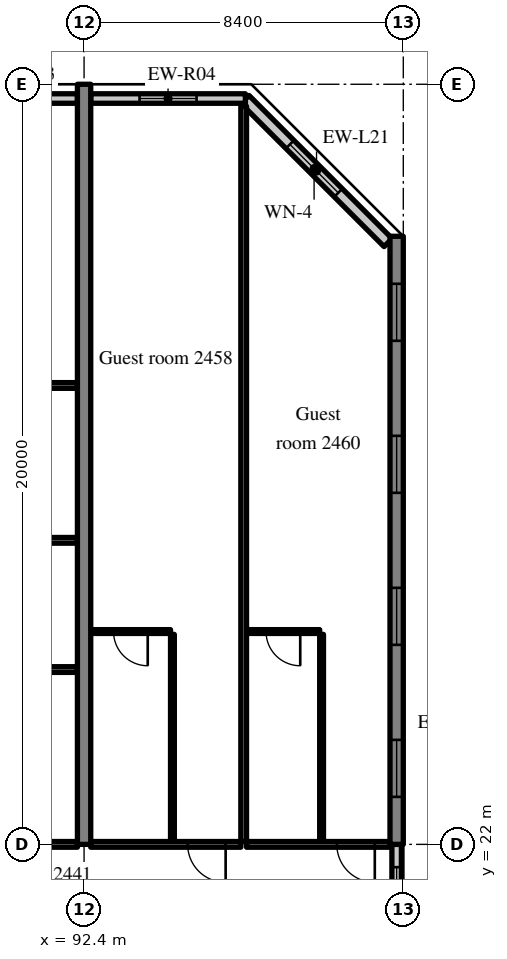
"""IFC4 building model, lengths in metres.
Left out: names, types, materials, properties, quantities, classifications, styles, units other than length and angle.
Written with IfcOpenShell. Run it as: python <this file> out.ifc"""

import sys

from ifc_helpers import new_model, si_unit, direction, frame, frame_2d, origin, place, context, subcontext, project, spatial, rectangle, extrude, source, transform, mapped, element, fill, save


model = new_model("IFC4")
c1 = context("Model", 3, precision=1e-05, world=origin(), true_north=direction((0.0, 1.0)))
c2 = subcontext(c1, "Body", "Model", "MODEL_VIEW")
j1 = project(units=[si_unit("LENGTHUNIT", "METRE"), si_unit("PLANEANGLEUNIT", "RADIAN")], contexts=[c1])
p1 = place(None, origin())
s1 = spatial("IfcSite", under=j1, at=p1, CompositionType="ELEMENT")
p2 = place(p1, origin())
s2 = spatial("IfcBuilding", under=s1, at=p2, CompositionType="ELEMENT")
p3 = place(p2, frame((0.0, 0.0, 102.8)))
s3 = spatial("IfcBuildingStorey", under=s2, at=p3, CompositionType="ELEMENT", Elevation=102.8)
m1 = source(origin(), c2, "Body", "SweptSolid", [
    extrude(rectangle(XDim=20.0, YDim=0.35, at=frame_2d((10.0, 0.0))), origin(), (0.0, 0.0, 1.0), 3.52),
])
p4 = place(p3, frame((92.4, 22.0, 0.0), z_axis=(0.0, 0.0, 1.0), x_axis=(0.0, 1.0, 0.0)))
e1 = element("IfcWall", 1, at=p4, inside=s3, PredefinedType="SHEAR", context=c2, shape_type="MappedRepresentation", body=[
    mapped(m1, transform((0.0, 0.0, 0.0), scale=1.0)),
])
m2 = source(origin(), c2, "Body", "SweptSolid", [
    extrude(rectangle(XDim=16.0, YDim=0.35, at=frame_2d((8.0, 0.0))), origin(), (0.0, 0.0, 1.0), 3.52),
])
p5 = place(p3, frame((100.625, 22.0, 0.0), z_axis=(0.0, 0.0, 1.0), x_axis=(0.0, 1.0, 0.0)))
e2 = element("IfcWall", 2, at=p5, inside=s3, PredefinedType="SHEAR", context=c2, shape_type="MappedRepresentation", body=[
    mapped(m2, transform((0.0, 0.0, 0.0), scale=1.0)),
])
m3 = source(origin(), c2, "Body", "SweptSolid", [
    extrude(rectangle(XDim=1.5, YDim=1.5, at=frame_2d((0.75, 0.75))), frame((0.0, 0.185, 0.0), z_axis=(0.0, -1.0, 0.0), x_axis=(1.0, 0.0, 0.0)), (0.0, 0.0, 1.0), 0.37),
])
p6 = place(p5, frame((1.25, 0.0, 0.9)))
e3 = element("IfcOpeningElement", 3, at=p6, cuts=e2, PredefinedType="OPENING", context=c2, shape_type="MappedRepresentation", body=[
    mapped(m3, transform((0.0, 0.0, 0.0), scale=1.0)),
])
p7 = place(p5, frame((5.25, 0.0, 0.9)))
e4 = element("IfcOpeningElement", 4, at=p7, cuts=e2, PredefinedType="OPENING", context=c2, shape_type="MappedRepresentation", body=[
    mapped(m3, transform((0.0, 0.0, 0.0), scale=1.0)),
])
p8 = place(p5, frame((9.25, 0.0, 0.9)))
e5 = element("IfcOpeningElement", 5, at=p8, cuts=e2, PredefinedType="OPENING", context=c2, shape_type="MappedRepresentation", body=[
    mapped(m3, transform((0.0, 0.0, 0.0), scale=1.0)),
])
p9 = place(p5, frame((13.25, 0.0, 0.9)))
e6 = element("IfcOpeningElement", 6, at=p9, cuts=e2, PredefinedType="OPENING", context=c2, shape_type="MappedRepresentation", body=[
    mapped(m3, transform((0.0, 0.0, 0.0), scale=1.0)),
])
m4 = source(origin(), c2, "Body", "SweptSolid", [
    extrude(rectangle(XDim=5.326, YDim=0.3, at=frame_2d((2.663, 0.0))), origin(), (0.0, 0.0, 1.0), 3.52),
])
p10 = place(p3, frame((100.4, 37.834, 0.0), z_axis=(0.0, 0.0, 1.0), x_axis=(-0.707083859269, 0.707129702361, 0.0)))
e7 = element("IfcWall", 7, at=p10, inside=s3, PredefinedType="SOLIDWALL", context=c2, shape_type="MappedRepresentation", body=[
    mapped(m4, transform((0.0, 0.0, 0.0), scale=1.0)),
])
m5 = source(origin(), c2, "Body", "SweptSolid", [
    extrude(rectangle(XDim=1.8, YDim=1.5, at=frame_2d((0.9, 0.75))), frame((0.0, 0.16, 0.0), z_axis=(0.0, -1.0, 0.0), x_axis=(1.0, 0.0, 0.0)), (0.0, 0.0, 1.0), 0.32),
])
p11 = place(p10, frame((1.854, 0.0, 0.9)))
e8 = element("IfcOpeningElement", 8, at=p11, cuts=e7, PredefinedType="OPENING", context=c2, shape_type="MappedRepresentation", body=[
    mapped(m5, transform((0.0, 0.0, 0.0), scale=1.0)),
])
m6 = source(origin(), c2, "Body", "SweptSolid", [
    extrude(rectangle(XDim=3.675, YDim=0.25, at=frame_2d((1.837, 0.0))), origin(), (0.0, 0.0, 1.0), 2.82),
])
p12 = place(p3, frame((92.225, 41.625, 0.0), z_axis=(0.0, 0.0, 1.0), x_axis=(-1.0, 0.0, 0.0)))
e9 = element("IfcWall", 9, at=p12, inside=s3, PredefinedType="SOLIDWALL", context=c2, shape_type="MappedRepresentation", body=[
    mapped(m6, transform((0.0, 0.0, 0.0), scale=1.0)),
])
m7 = source(origin(), c2, "Body", "SweptSolid", [
    extrude(rectangle(XDim=1.5, YDim=1.5, at=frame_2d((0.75, 0.75))), frame((0.0, 0.135, 0.0), z_axis=(0.0, -1.0, 0.0), x_axis=(1.0, 0.0, 0.0)), (0.0, 0.0, 1.0), 0.27),
])
p13 = place(p12, frame((1.087, 0.0, 0.9)))
e10 = element("IfcOpeningElement", 10, at=p13, cuts=e9, PredefinedType="OPENING", context=c2, shape_type="MappedRepresentation", body=[
    mapped(m7, transform((0.0, 0.0, 0.0), scale=1.0)),
])
m8 = source(origin(), c2, "Body", "SweptSolid", [
    extrude(rectangle(XDim=4.07, YDim=0.25, at=frame_2d((2.035, 0.0))), origin(), (0.0, 0.0, 1.0), 2.82),
])
p14 = place(p3, frame((96.645, 41.625, 0.0), z_axis=(0.0, 0.0, 1.0), x_axis=(-1.0, 0.0, 0.0)))
e11 = element("IfcWall", 11, at=p14, inside=s3, PredefinedType="SOLIDWALL", context=c2, shape_type="MappedRepresentation", body=[
    mapped(m8, transform((0.0, 0.0, 0.0), scale=1.0)),
])
p15 = place(p14, frame((1.285, 0.0, 0.9)))
e12 = element("IfcOpeningElement", 12, at=p15, cuts=e11, PredefinedType="OPENING", context=c2, shape_type="MappedRepresentation", body=[
    mapped(m7, transform((0.0, 0.0, 0.0), scale=1.0)),
])
m9 = source(origin(), c2, "Body", "SweptSolid", [
    extrude(rectangle(XDim=2.4, YDim=0.25, at=frame_2d((1.2, 0.0))), origin(), (0.0, 0.0, 1.0), 2.62),
])
p16 = place(p3, frame((100.625, 19.6, 0.0), z_axis=(0.0, 0.0, 1.0), x_axis=(0.0, 1.0, 0.0)))
e13 = element("IfcWall", 13, at=p16, inside=s3, PredefinedType="SOLIDWALL", context=c2, shape_type="MappedRepresentation", body=[
    mapped(m9, transform((0.0, 0.0, 0.0), scale=1.0)),
])
m10 = source(origin(), c2, "Body", "SweptSolid", [
    extrude(rectangle(XDim=1.2, YDim=1.5, at=frame_2d((0.6, 0.75))), frame((0.0, 0.135, 0.0), z_axis=(0.0, -1.0, 0.0), x_axis=(1.0, 0.0, 0.0)), (0.0, 0.0, 1.0), 0.27),
])
p17 = place(p16, frame((0.6, 0.0, 0.9)))
e14 = element("IfcOpeningElement", 14, at=p17, cuts=e13, PredefinedType="OPENING", context=c2, shape_type="MappedRepresentation", body=[
    mapped(m10, transform((0.0, 0.0, 0.0), scale=1.0)),
])
m11 = source(origin(), c2, "Body", "SweptSolid", [
    extrude(rectangle(XDim=5.5, YDim=0.15, at=frame_2d((2.75, 0.0))), origin(), (0.0, 0.0, 1.0), 2.82),
])
p18 = place(p3, frame((86.725, 22.0, 0.0), z_axis=(0.0, 0.0, 1.0), x_axis=(1.0, 0.0, 0.0)))
e15 = element("IfcWall", 15, at=p18, inside=s3, PredefinedType="PARTITIONING", context=c2, shape_type="MappedRepresentation", body=[
    mapped(m11, transform((0.0, 0.0, 0.0), scale=1.0)),
])
m12 = source(origin(), c2, "Body", "SweptSolid", [
    extrude(rectangle(XDim=5.5, YDim=0.15, at=frame_2d((2.75, 0.0))), origin(), (0.0, 0.0, 1.0), 3.52),
])
for number, where, z_axis, x_axis in (
    (16, (86.725, 26.6, 0.0), (0.0, 0.0, 1.0), (1.0, 0.0, 0.0)),
    (17, (86.725, 30.0, 0.0), (0.0, 0.0, 1.0), (1.0, 0.0, 0.0)),
):
    element("IfcWall", number, at=place(p3, frame(where, z_axis=z_axis, x_axis=x_axis)), inside=s3, PredefinedType="PARTITIONING", context=c2, shape_type="MappedRepresentation", body=[
        mapped(m12, transform((0.0, 0.0, 0.0), scale=1.0)),
    ])
m13 = source(origin(), c2, "Body", "SweptSolid", [
    extrude(rectangle(XDim=8.05, YDim=0.15, at=frame_2d((4.025, 0.0))), origin(), (0.0, 0.0, 1.0), 3.52),
])
p19 = place(p3, frame((84.175, 34.075, 0.0), z_axis=(0.0, 0.0, 1.0), x_axis=(1.0, 0.0, 0.0)))
e18 = element("IfcWall", 18, at=p19, inside=s3, PredefinedType="PARTITIONING", context=c2, shape_type="MappedRepresentation", body=[
    mapped(m13, transform((0.0, 0.0, 0.0), scale=1.0)),
])
m14 = source(origin(), c2, "Body", "SweptSolid", [
    extrude(rectangle(XDim=1.0, YDim=2.1, at=frame_2d((0.5, 1.05))), frame((0.0, 0.085, 0.0), z_axis=(0.0, -1.0, 0.0), x_axis=(1.0, 0.0, 0.0)), (0.0, 0.0, 1.0), 0.17),
])
p20 = place(p19, frame((0.7, 0.0, 0.0)))
e19 = element("IfcOpeningElement", 19, at=p20, cuts=e18, PredefinedType="OPENING", context=c2, shape_type="MappedRepresentation", body=[
    mapped(m14, transform((0.0, 0.0, 0.0), scale=1.0)),
])
m15 = source(origin(), c2, "Body", "SweptSolid", [
    extrude(rectangle(XDim=5.45, YDim=0.1, at=frame_2d((2.725, 0.0))), origin(), (0.0, 0.0, 1.0), 3.52),
])
p21 = place(p3, frame((94.725, 22.075, 0.0), z_axis=(0.0, 0.0, 1.0), x_axis=(0.0, 1.0, 0.0)))
e20 = element("IfcWall", 20, at=p21, inside=s3, PredefinedType="PARTITIONING", context=c2, shape_type="MappedRepresentation", body=[
    mapped(m15, transform((0.0, 0.0, 0.0), scale=1.0)),
])
m16 = source(origin(), c2, "Body", "SweptSolid", [
    extrude(rectangle(XDim=2.1, YDim=0.1, at=frame_2d((1.05, 0.0))), origin(), (0.0, 0.0, 1.0), 3.52),
])
p22 = place(p3, frame((92.575, 27.6, 0.0), z_axis=(0.0, 0.0, 1.0), x_axis=(1.0, 0.0, 0.0)))
e21 = element("IfcWall", 21, at=p22, inside=s3, PredefinedType="PARTITIONING", context=c2, shape_type="MappedRepresentation", body=[
    mapped(m16, transform((0.0, 0.0, 0.0), scale=1.0)),
])
m17 = source(origin(), c2, "Body", "SweptSolid", [
    extrude(rectangle(XDim=0.9, YDim=2.1, at=frame_2d((0.45, 1.05))), frame((0.0, 0.06, 0.0), z_axis=(0.0, -1.0, 0.0), x_axis=(1.0, 0.0, 0.0)), (0.0, 0.0, 1.0), 0.12),
])
p23 = place(p22, frame((0.6, 0.0, 0.0)))
e22 = element("IfcOpeningElement", 22, at=p23, cuts=e21, PredefinedType="OPENING", context=c2, shape_type="MappedRepresentation", body=[
    mapped(m17, transform((0.0, 0.0, 0.0), scale=1.0)),
])
m18 = source(origin(), c2, "Body", "SweptSolid", [
    extrude(rectangle(XDim=3.95, YDim=0.15, at=frame_2d((1.975, 0.0))), origin(), (0.0, 0.0, 1.0), 2.82),
])
p24 = place(p3, frame((92.575, 22.0, 0.0), z_axis=(0.0, 0.0, 1.0), x_axis=(1.0, 0.0, 0.0)))
e23 = element("IfcWall", 23, at=p24, inside=s3, PredefinedType="PARTITIONING", context=c2, shape_type="MappedRepresentation", body=[
    mapped(m18, transform((0.0, 0.0, 0.0), scale=1.0)),
])
p25 = place(p24, frame((2.55, 0.0, 0.0)))
e24 = element("IfcOpeningElement", 24, at=p25, cuts=e23, PredefinedType="OPENING", context=c2, shape_type="MappedRepresentation", body=[
    mapped(m14, transform((0.0, 0.0, 0.0), scale=1.0)),
])
p26 = place(p3, frame((98.65, 22.075, 0.0), z_axis=(0.0, 0.0, 1.0), x_axis=(0.0, 1.0, 0.0)))
e25 = element("IfcWall", 25, at=p26, inside=s3, PredefinedType="PARTITIONING", context=c2, shape_type="MappedRepresentation", body=[
    mapped(m15, transform((0.0, 0.0, 0.0), scale=1.0)),
])
m19 = source(origin(), c2, "Body", "SweptSolid", [
    extrude(rectangle(XDim=1.925, YDim=0.1, at=frame_2d((0.962, 0.0))), origin(), (0.0, 0.0, 1.0), 3.52),
])
p27 = place(p3, frame((96.675, 27.6, 0.0), z_axis=(0.0, 0.0, 1.0), x_axis=(1.0, 0.0, 0.0)))
e26 = element("IfcWall", 26, at=p27, inside=s3, PredefinedType="PARTITIONING", context=c2, shape_type="MappedRepresentation", body=[
    mapped(m19, transform((0.0, 0.0, 0.0), scale=1.0)),
])
p28 = place(p27, frame((0.513, 0.0, 0.0)))
e27 = element("IfcOpeningElement", 27, at=p28, cuts=e26, PredefinedType="OPENING", context=c2, shape_type="MappedRepresentation", body=[
    mapped(m17, transform((0.0, 0.0, 0.0), scale=1.0)),
])
m20 = source(origin(), c2, "Body", "SweptSolid", [
    extrude(rectangle(XDim=3.775, YDim=0.15, at=frame_2d((1.887, 0.0))), origin(), (0.0, 0.0, 1.0), 2.82),
])
p29 = place(p3, frame((96.675, 22.0, 0.0), z_axis=(0.0, 0.0, 1.0), x_axis=(1.0, 0.0, 0.0)))
e28 = element("IfcWall", 28, at=p29, inside=s3, PredefinedType="PARTITIONING", context=c2, shape_type="MappedRepresentation", body=[
    mapped(m20, transform((0.0, 0.0, 0.0), scale=1.0)),
])
p30 = place(p29, frame((2.375, 0.0, 0.0)))
e29 = element("IfcOpeningElement", 29, at=p30, cuts=e28, PredefinedType="OPENING", context=c2, shape_type="MappedRepresentation", body=[
    mapped(m14, transform((0.0, 0.0, 0.0), scale=1.0)),
])
m21 = source(origin(), c2, "Body", "SweptSolid", [
    extrude(rectangle(XDim=19.347, YDim=0.15, at=frame_2d((9.674, 0.0))), origin(), (0.0, 0.0, 1.0), 3.52),
])
p31 = place(p3, frame((96.6, 22.075, 0.0), z_axis=(0.0, 0.0, 1.0), x_axis=(0.0, 1.0, 0.0)))
e30 = element("IfcWall", 30, at=p31, inside=s3, PredefinedType="PARTITIONING", context=c2, shape_type="MappedRepresentation", body=[
    mapped(m21, transform((0.0, 0.0, 0.0), scale=1.0)),
])
m22 = source(origin(), c2, "Body", "SweptSolid", [
    extrude(rectangle(XDim=1.8, YDim=1.5, at=frame_2d((0.9, 0.75))), frame((0.0, 0.03, 0.0), z_axis=(0.0, -1.0, 0.0), x_axis=(1.0, 0.0, 0.0)), (0.0, 0.0, 1.0), 0.06),
])
p32 = place(p11, origin())
e31 = element("IfcWindow", 31, at=p32, inside=s3, PartitioningType="SINGLE_PANEL", PredefinedType="WINDOW", context=c2, shape_type="MappedRepresentation", body=[
    mapped(m22, transform((0.0, 0.0, 0.0), scale=1.0)),
])
fill(e8, e31)
m23 = source(origin(), c2, "Body", "SweptSolid", [
    extrude(rectangle(XDim=1.5, YDim=1.5, at=frame_2d((0.75, 0.75))), frame((0.0, 0.03, 0.0), z_axis=(0.0, -1.0, 0.0), x_axis=(1.0, 0.0, 0.0)), (0.0, 0.0, 1.0), 0.06),
])
p33 = place(p15, origin())
e32 = element("IfcWindow", 32, at=p33, inside=s3, PartitioningType="SINGLE_PANEL", PredefinedType="WINDOW", context=c2, shape_type="MappedRepresentation", body=[
    mapped(m23, transform((0.0, 0.0, 0.0), scale=1.0)),
])
fill(e12, e32)
p34 = place(p6, origin())
e33 = element("IfcWindow", 33, at=p34, inside=s3, PartitioningType="SINGLE_PANEL", PredefinedType="WINDOW", context=c2, shape_type="MappedRepresentation", body=[
    mapped(m23, transform((0.0, 0.0, 0.0), scale=1.0)),
])
fill(e3, e33)
p35 = place(p7, origin())
e34 = element("IfcWindow", 34, at=p35, inside=s3, PartitioningType="SINGLE_PANEL", PredefinedType="WINDOW", context=c2, shape_type="MappedRepresentation", body=[
    mapped(m23, transform((0.0, 0.0, 0.0), scale=1.0)),
])
fill(e4, e34)
p36 = place(p8, origin())
e35 = element("IfcWindow", 35, at=p36, inside=s3, PartitioningType="SINGLE_PANEL", PredefinedType="WINDOW", context=c2, shape_type="MappedRepresentation", body=[
    mapped(m23, transform((0.0, 0.0, 0.0), scale=1.0)),
])
fill(e5, e35)
p37 = place(p9, origin())
e36 = element("IfcWindow", 36, at=p37, inside=s3, PartitioningType="SINGLE_PANEL", PredefinedType="WINDOW", context=c2, shape_type="MappedRepresentation", body=[
    mapped(m23, transform((0.0, 0.0, 0.0), scale=1.0)),
])
fill(e6, e36)
m24 = source(origin(), c2, "Body", "SweptSolid", [
    extrude(rectangle(XDim=1.2, YDim=1.5, at=frame_2d((0.6, 0.75))), frame((0.0, 0.03, 0.0), z_axis=(0.0, -1.0, 0.0), x_axis=(1.0, 0.0, 0.0)), (0.0, 0.0, 1.0), 0.06),
])
p38 = place(p17, origin())
e37 = element("IfcWindow", 37, at=p38, inside=s3, PartitioningType="SINGLE_PANEL", PredefinedType="WINDOW", context=c2, shape_type="MappedRepresentation", body=[
    mapped(m24, transform((0.0, 0.0, 0.0), scale=1.0)),
])
fill(e14, e37)
m25 = source(origin(), c2, "Body", "SweptSolid", [
    extrude(rectangle(XDim=0.9, YDim=2.1, at=frame_2d((0.45, 1.05))), frame((0.0, 0.025, 0.0), z_axis=(0.0, -1.0, 0.0), x_axis=(1.0, 0.0, 0.0)), (0.0, 0.0, 1.0), 0.05),
])
p39 = place(p23, origin())
e38 = element("IfcDoor", 38, at=p39, inside=s3, OperationType="SINGLE_SWING_RIGHT", PredefinedType="DOOR", context=c2, shape_type="MappedRepresentation", body=[
    mapped(m25, transform((0.0, 0.0, 0.0), scale=1.0)),
])
fill(e22, e38)
m26 = source(origin(), c2, "Body", "SweptSolid", [
    extrude(rectangle(XDim=1.0, YDim=2.1, at=frame_2d((0.5, 1.05))), frame((0.0, 0.025, 0.0), z_axis=(0.0, -1.0, 0.0), x_axis=(1.0, 0.0, 0.0)), (0.0, 0.0, 1.0), 0.05),
])
p40 = place(p25, origin())
e39 = element("IfcDoor", 39, at=p40, inside=s3, OperationType="SINGLE_SWING_RIGHT", PredefinedType="DOOR", context=c2, shape_type="MappedRepresentation", body=[
    mapped(m26, transform((0.0, 0.0, 0.0), scale=1.0)),
])
fill(e24, e39)
p41 = place(p28, origin())
e40 = element("IfcDoor", 40, at=p41, inside=s3, OperationType="SINGLE_SWING_RIGHT", PredefinedType="DOOR", context=c2, shape_type="MappedRepresentation", body=[
    mapped(m25, transform((0.0, 0.0, 0.0), scale=1.0)),
])
fill(e27, e40)
p42 = place(p30, origin())
e41 = element("IfcDoor", 41, at=p42, inside=s3, OperationType="SINGLE_SWING_RIGHT", PredefinedType="DOOR", context=c2, shape_type="MappedRepresentation", body=[
    mapped(m26, transform((0.0, 0.0, 0.0), scale=1.0)),
])
fill(e29, e41)
save(model, sys.argv[1])
